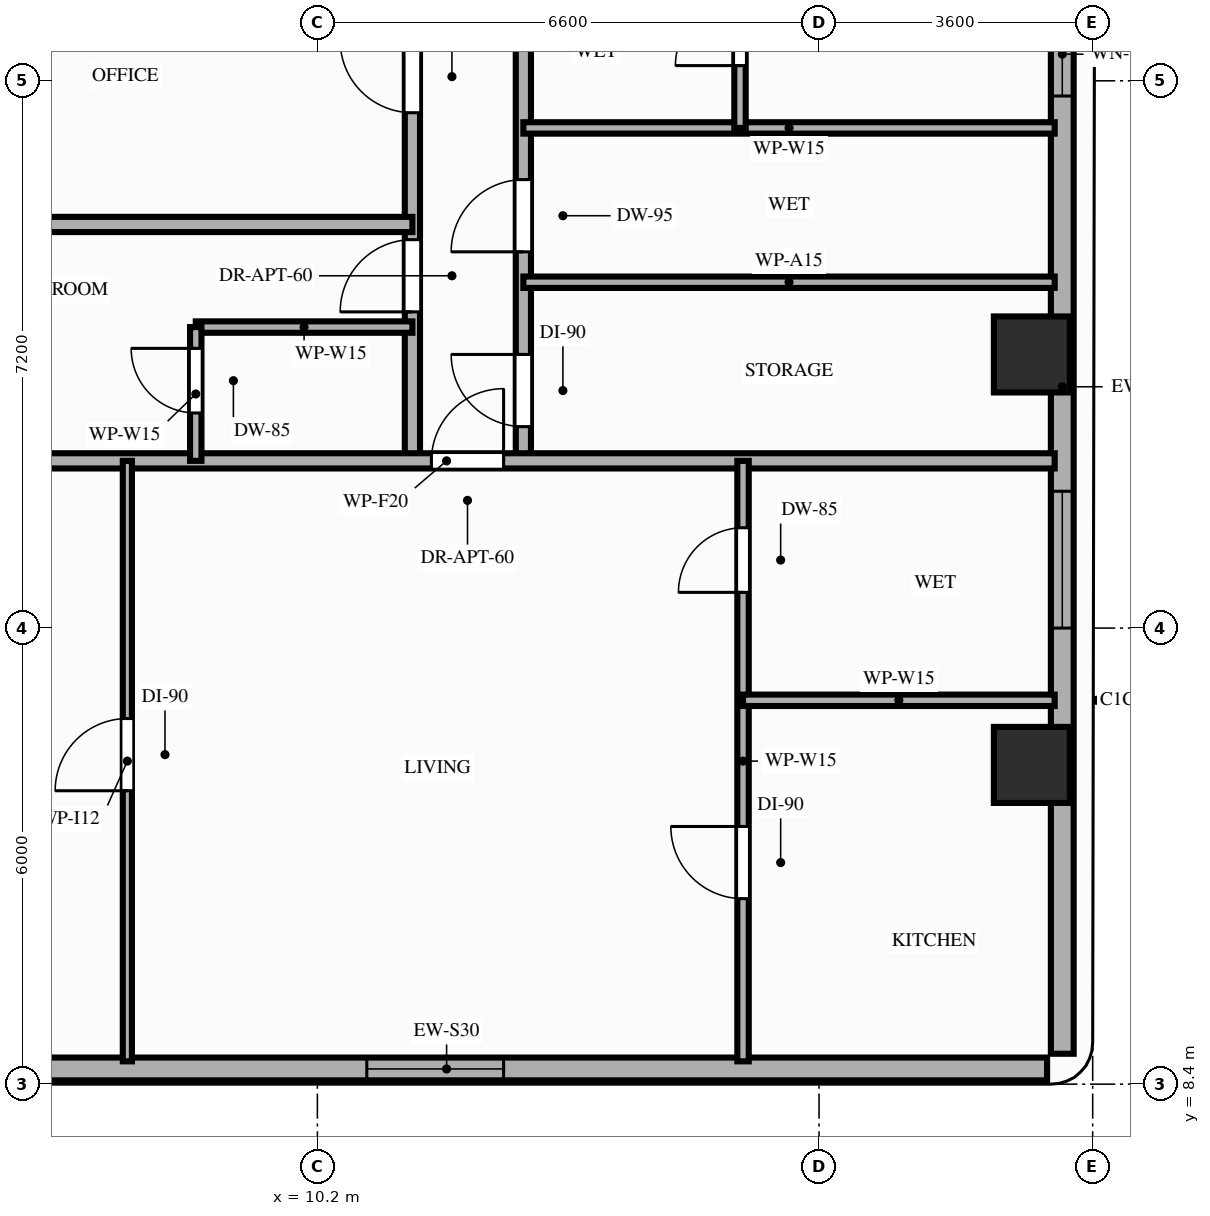
"""IFC4 building model, lengths in metres.
Left out: names, types, materials, properties, quantities, classifications, styles, units other than length and angle.
Written with IfcOpenShell. Run it as: python <this file> out.ifc"""

import sys

from ifc_helpers import new_model, si_unit, direction, frame, frame_2d, origin, origin_2d, place, context, subcontext, project, spatial, rectangle, extrude, element, fill, save


model = new_model("IFC4")
c1 = context("Model", 3, precision=1e-05, world=origin(), true_north=direction((0.0, 1.0)))
c2 = subcontext(c1, "Body", "Model", "MODEL_VIEW")
j1 = project(units=[si_unit("LENGTHUNIT", "METRE"), si_unit("PLANEANGLEUNIT", "RADIAN")], contexts=[c1])
p1 = place(None, origin())
s1 = spatial("IfcSite", under=j1, at=p1, CompositionType="ELEMENT")
p2 = place(p1, origin())
s2 = spatial("IfcBuilding", under=s1, at=p2, CompositionType="ELEMENT")
p3 = place(p2, frame((0.0, 0.0, 145.8)))
s3 = spatial("IfcBuildingStorey", under=s2, at=p3, CompositionType="ELEMENT", Elevation=145.8)
for number, where, z_axis, x_axis in (
    (1, (19.6, 12.6, 0.0), (0.0, 0.0, 1.0), (1.0, 0.0, 0.0)),
    (2, (19.6, 18.0, 0.0), (0.0, 0.0, 1.0), (1.0, 0.0, 0.0)),
):
    element("IfcColumn", number, at=place(p3, frame(where, z_axis=z_axis, x_axis=x_axis)), inside=s3, PredefinedType="COLUMN", context=c2, shape_type="SweptSolid", body=[
        extrude(rectangle(XDim=1.0, YDim=1.0, at=origin_2d()), origin(), (0.0, 0.0, 1.0), 3.2),
    ])
p4 = place(p3, frame((4.0, 8.6, 0.0), z_axis=(0.0, 0.0, 1.0), x_axis=(1.0, 0.0, 0.0)))
e3 = element("IfcWall", 3, at=p4, inside=s3, PredefinedType="STANDARD", context=c2, shape_type="SweptSolid", body=[
    extrude(rectangle(XDim=15.8, YDim=0.3, at=frame_2d((7.9, 0.0))), origin(), (0.0, 0.0, 1.0), 3.02),
])
p5 = place(p4, frame((6.85, 0.0, 0.85)))
e4 = element("IfcOpeningElement", 4, at=p5, cuts=e3, PredefinedType="OPENING", context=c2, shape_type="SweptSolid", body=[
    extrude(rectangle(XDim=1.8, YDim=1.75, at=frame_2d((0.9, 0.875))), frame((0.0, 0.16, 0.0), z_axis=(0.0, -1.0, 0.0), x_axis=(1.0, 0.0, 0.0)), (0.0, 0.0, 1.0), 0.32),
])
p6 = place(p3, frame((20.0, 8.8, 0.0), z_axis=(0.0, 0.0, 1.0), x_axis=(0.0, 1.0, 0.0)))
e5 = element("IfcWall", 5, at=p6, inside=s3, PredefinedType="STANDARD", context=c2, shape_type="SweptSolid", body=[
    extrude(rectangle(XDim=17.55, YDim=0.3, at=frame_2d((8.775, 0.0))), origin(), (0.0, 0.0, 1.0), 2.45),
])
p7 = place(p6, frame((12.6, 0.0, 0.85)))
e6 = element("IfcOpeningElement", 6, at=p7, cuts=e5, PredefinedType="OPENING", context=c2, shape_type="SweptSolid", body=[
    extrude(rectangle(XDim=1.1, YDim=1.35, at=frame_2d((0.55, 0.675))), frame((0.0, 0.16, 0.0), z_axis=(0.0, -1.0, 0.0), x_axis=(1.0, 0.0, 0.0)), (0.0, 0.0, 1.0), 0.32),
])
p8 = place(p6, frame((5.6, 0.0, 0.85)))
e7 = element("IfcOpeningElement", 7, at=p8, cuts=e5, PredefinedType="OPENING", context=c2, shape_type="SweptSolid", body=[
    extrude(rectangle(XDim=1.8, YDim=1.35, at=frame_2d((0.9, 0.675))), frame((0.0, 0.16, 0.0), z_axis=(0.0, -1.0, 0.0), x_axis=(1.0, 0.0, 0.0)), (0.0, 0.0, 1.0), 0.32),
])
p9 = place(p3, frame((11.45, 16.6, 0.0), z_axis=(0.0, 0.0, 1.0), x_axis=(0.0, 1.0, 0.0)))
e8 = element("IfcWall", 8, at=p9, inside=s3, PredefinedType="PARTITIONING", context=c2, shape_type="SweptSolid", body=[
    extrude(rectangle(XDim=11.5, YDim=0.2, at=frame_2d((5.75, 0.0))), origin(), (0.0, 0.0, 1.0), 2.45),
])
p10 = place(p9, frame((1.96, 0.0, 0.0)))
e9 = element("IfcOpeningElement", 9, at=p10, cuts=e8, PredefinedType="OPENING", context=c2, shape_type="SweptSolid", body=[
    extrude(rectangle(XDim=0.95, YDim=2.15, at=frame_2d((0.475, 1.075))), frame((0.0, 0.11, 0.0), z_axis=(0.0, -1.0, 0.0), x_axis=(1.0, 0.0, 0.0)), (0.0, 0.0, 1.0), 0.22),
])
p11 = place(p9, frame((4.58, 0.0, 0.0)))
e10 = element("IfcOpeningElement", 10, at=p11, cuts=e8, PredefinedType="OPENING", context=c2, shape_type="SweptSolid", body=[
    extrude(rectangle(XDim=0.95, YDim=2.15, at=frame_2d((0.475, 1.075))), frame((0.0, 0.11, 0.0), z_axis=(0.0, -1.0, 0.0), x_axis=(1.0, 0.0, 0.0)), (0.0, 0.0, 1.0), 0.22),
])
p12 = place(p9, frame((8.78, 0.0, 0.0)))
e11 = element("IfcOpeningElement", 11, at=p12, cuts=e8, PredefinedType="OPENING", context=c2, shape_type="SweptSolid", body=[
    extrude(rectangle(XDim=0.95, YDim=2.15, at=frame_2d((0.475, 1.075))), frame((0.0, 0.11, 0.0), z_axis=(0.0, -1.0, 0.0), x_axis=(1.0, 0.0, 0.0)), (0.0, 0.0, 1.0), 0.22),
])
p13 = place(p3, frame((12.91, 16.6, 0.0), z_axis=(0.0, 0.0, 1.0), x_axis=(0.0, 1.0, 0.0)))
e12 = element("IfcWall", 12, at=p13, inside=s3, PredefinedType="PARTITIONING", context=c2, shape_type="SweptSolid", body=[
    extrude(rectangle(XDim=11.5, YDim=0.2, at=frame_2d((5.75, 0.0))), origin(), (0.0, 0.0, 1.0), 2.45),
])
p14 = place(p13, frame((0.45, 0.0, 0.0)))
e13 = element("IfcOpeningElement", 13, at=p14, cuts=e12, PredefinedType="OPENING", context=c2, shape_type="SweptSolid", body=[
    extrude(rectangle(XDim=0.95, YDim=2.15, at=frame_2d((0.475, 1.075))), frame((0.0, 0.11, 0.0), z_axis=(0.0, -1.0, 0.0), x_axis=(1.0, 0.0, 0.0)), (0.0, 0.0, 1.0), 0.22),
])
p15 = place(p13, frame((2.75, 0.0, 0.0)))
e14 = element("IfcOpeningElement", 14, at=p15, cuts=e12, PredefinedType="OPENING", context=c2, shape_type="SweptSolid", body=[
    extrude(rectangle(XDim=0.95, YDim=2.1, at=frame_2d((0.475, 1.05))), frame((0.0, 0.11, 0.0), z_axis=(0.0, -1.0, 0.0), x_axis=(1.0, 0.0, 0.0)), (0.0, 0.0, 1.0), 0.22),
])
p16 = place(p13, frame((9.86, 0.0, 0.0)))
e15 = element("IfcOpeningElement", 15, at=p16, cuts=e12, PredefinedType="OPENING", context=c2, shape_type="SweptSolid", body=[
    extrude(rectangle(XDim=0.95, YDim=2.15, at=frame_2d((0.475, 1.075))), frame((0.0, 0.11, 0.0), z_axis=(0.0, -1.0, 0.0), x_axis=(1.0, 0.0, 0.0)), (0.0, 0.0, 1.0), 0.22),
])
p17 = place(p13, frame((7.27, 0.0, 0.0)))
e16 = element("IfcOpeningElement", 16, at=p17, cuts=e12, PredefinedType="OPENING", context=c2, shape_type="SweptSolid", body=[
    extrude(rectangle(XDim=0.95, YDim=2.15, at=frame_2d((0.475, 1.075))), frame((0.0, 0.11, 0.0), z_axis=(0.0, -1.0, 0.0), x_axis=(1.0, 0.0, 0.0)), (0.0, 0.0, 1.0), 0.22),
])
p18 = place(p3, frame((3.9, 16.6, 0.0), z_axis=(0.0, 0.0, 1.0), x_axis=(1.0, 0.0, 0.0)))
e17 = element("IfcWall", 17, at=p18, inside=s3, PredefinedType="PARTITIONING", context=c2, shape_type="SweptSolid", body=[
    extrude(rectangle(XDim=16.0, YDim=0.2, at=frame_2d((8.0, 0.0))), origin(), (0.0, 0.0, 1.0), 2.45),
])
p19 = place(p18, frame((7.8, 0.0, 0.0)))
e18 = element("IfcOpeningElement", 18, at=p19, cuts=e17, PredefinedType="OPENING", context=c2, shape_type="SweptSolid", body=[
    extrude(rectangle(XDim=0.95, YDim=2.15, at=frame_2d((0.475, 1.075))), frame((0.0, 0.11, 0.0), z_axis=(0.0, -1.0, 0.0), x_axis=(1.0, 0.0, 0.0)), (0.0, 0.0, 1.0), 0.22),
])
p20 = place(p3, frame((8.6, 18.36, 0.0), z_axis=(0.0, 0.0, 1.0), x_axis=(1.0, 0.0, 0.0)))
e19 = element("IfcWall", 19, at=p20, inside=s3, PredefinedType="PARTITIONING", context=c2, shape_type="SweptSolid", body=[
    extrude(rectangle(XDim=2.85, YDim=0.15, at=frame_2d((1.425, 0.0))), origin(), (0.0, 0.0, 1.0), 2.45),
])
p21 = place(p3, frame((8.6, 16.6, 0.0), z_axis=(0.0, 0.0, 1.0), x_axis=(0.0, 1.0, 0.0)))
e20 = element("IfcWall", 20, at=p21, inside=s3, PredefinedType="PARTITIONING", context=c2, shape_type="SweptSolid", body=[
    extrude(rectangle(XDim=1.76, YDim=0.15, at=frame_2d((0.88, 0.0))), origin(), (0.0, 0.0, 1.0), 2.45),
])
p22 = place(p21, frame((0.63, 0.0, 0.0)))
e21 = element("IfcOpeningElement", 21, at=p22, cuts=e20, PredefinedType="OPENING", context=c2, shape_type="SweptSolid", body=[
    extrude(rectangle(XDim=0.85, YDim=2.1, at=frame_2d((0.425, 1.05))), frame((0.0, 0.085, 0.0), z_axis=(0.0, -1.0, 0.0), x_axis=(1.0, 0.0, 0.0)), (0.0, 0.0, 1.0), 0.17),
])
p23 = place(p3, frame((3.9, 19.71, 0.0), z_axis=(0.0, 0.0, 1.0), x_axis=(1.0, 0.0, 0.0)))
e22 = element("IfcWall", 22, at=p23, inside=s3, PredefinedType="PARTITIONING", context=c2, shape_type="SweptSolid", body=[
    extrude(rectangle(XDim=7.55, YDim=0.2, at=frame_2d((3.775, 0.0))), origin(), (0.0, 0.0, 1.0), 2.45),
])
p24 = place(p3, frame((7.7, 8.7, 0.0), z_axis=(0.0, 0.0, 1.0), x_axis=(0.0, 1.0, 0.0)))
e23 = element("IfcWall", 23, at=p24, inside=s3, PredefinedType="PARTITIONING", context=c2, shape_type="SweptSolid", body=[
    extrude(rectangle(XDim=7.9, YDim=0.12, at=frame_2d((3.95, 0.0))), origin(), (0.0, 0.0, 1.0), 2.45),
])
p25 = place(p24, frame((3.56, 0.0, 0.0)))
e24 = element("IfcOpeningElement", 24, at=p25, cuts=e23, PredefinedType="OPENING", context=c2, shape_type="SweptSolid", body=[
    extrude(rectangle(XDim=0.95, YDim=2.15, at=frame_2d((0.475, 1.075))), frame((0.0, 0.07, 0.0), z_axis=(0.0, -1.0, 0.0), x_axis=(1.0, 0.0, 0.0)), (0.0, 0.0, 1.0), 0.14),
])
p26 = place(p3, frame((15.8, 8.7, 0.0), z_axis=(0.0, 0.0, 1.0), x_axis=(0.0, 1.0, 0.0)))
e25 = element("IfcWall", 25, at=p26, inside=s3, PredefinedType="PARTITIONING", context=c2, shape_type="SweptSolid", body=[
    extrude(rectangle(XDim=7.9, YDim=0.15, at=frame_2d((3.95, 0.0))), origin(), (0.0, 0.0, 1.0), 2.45),
])
p27 = place(p26, frame((2.14, 0.0, 0.0)))
e26 = element("IfcOpeningElement", 26, at=p27, cuts=e25, PredefinedType="OPENING", context=c2, shape_type="SweptSolid", body=[
    extrude(rectangle(XDim=0.95, YDim=2.15, at=frame_2d((0.475, 1.075))), frame((0.0, 0.085, 0.0), z_axis=(0.0, -1.0, 0.0), x_axis=(1.0, 0.0, 0.0)), (0.0, 0.0, 1.0), 0.17),
])
p28 = place(p26, frame((6.17, 0.0, 0.0)))
e27 = element("IfcOpeningElement", 27, at=p28, cuts=e25, PredefinedType="OPENING", context=c2, shape_type="SweptSolid", body=[
    extrude(rectangle(XDim=0.85, YDim=2.1, at=frame_2d((0.425, 1.05))), frame((0.0, 0.085, 0.0), z_axis=(0.0, -1.0, 0.0), x_axis=(1.0, 0.0, 0.0)), (0.0, 0.0, 1.0), 0.17),
])
p29 = place(p3, frame((15.8, 13.45, 0.0), z_axis=(0.0, 0.0, 1.0), x_axis=(1.0, 0.0, 0.0)))
e28 = element("IfcWall", 28, at=p29, inside=s3, PredefinedType="PARTITIONING", context=c2, shape_type="SweptSolid", body=[
    extrude(rectangle(XDim=4.1, YDim=0.15, at=frame_2d((2.05, 0.0))), origin(), (0.0, 0.0, 1.0), 2.45),
])
for number, where, z_axis, x_axis in (
    (29, (12.91, 18.95, 0.0), (0.0, 0.0, 1.0), (1.0, 0.0, 0.0)),
    (30, (12.91, 20.98, 0.0), (0.0, 0.0, 1.0), (1.0, 0.0, 0.0)),
):
    element("IfcWall", number, at=place(p3, frame(where, z_axis=z_axis, x_axis=x_axis)), inside=s3, PredefinedType="PARTITIONING", context=c2, shape_type="SweptSolid", body=[
        extrude(rectangle(XDim=6.99, YDim=0.15, at=frame_2d((3.495, 0.0))), origin(), (0.0, 0.0, 1.0), 2.45),
    ])
p30 = place(p3, frame((15.76, 20.98, 0.0), z_axis=(0.0, 0.0, 1.0), x_axis=(0.0, 1.0, 0.0)))
e31 = element("IfcWall", 31, at=p30, inside=s3, PredefinedType="PARTITIONING", context=c2, shape_type="SweptSolid", body=[
    extrude(rectangle(XDim=1.95, YDim=0.15, at=frame_2d((0.975, 0.0))), origin(), (0.0, 0.0, 1.0), 3.02),
])
p31 = place(p30, frame((0.82, 0.0, 0.0)))
e32 = element("IfcOpeningElement", 32, at=p31, cuts=e31, PredefinedType="OPENING", context=c2, shape_type="SweptSolid", body=[
    extrude(rectangle(XDim=0.85, YDim=2.1, at=frame_2d((0.425, 1.05))), frame((0.0, 0.085, 0.0), z_axis=(0.0, -1.0, 0.0), x_axis=(1.0, 0.0, 0.0)), (0.0, 0.0, 1.0), 0.17),
])
p32 = place(p5, origin())
e33 = element("IfcWindow", 33, at=p32, inside=s3, PartitioningType="SINGLE_PANEL", PredefinedType="WINDOW", context=c2, shape_type="SweptSolid", body=[
    extrude(rectangle(XDim=1.8, YDim=1.75, at=frame_2d((0.9, 0.875))), frame((0.0, 0.03, 0.0), z_axis=(0.0, -1.0, 0.0), x_axis=(1.0, 0.0, 0.0)), (0.0, 0.0, 1.0), 0.06),
])
fill(e4, e33)
p33 = place(p7, origin())
e34 = element("IfcWindow", 34, at=p33, inside=s3, PartitioningType="SINGLE_PANEL", PredefinedType="WINDOW", context=c2, shape_type="SweptSolid", body=[
    extrude(rectangle(XDim=1.1, YDim=1.35, at=frame_2d((0.55, 0.675))), frame((0.0, 0.03, 0.0), z_axis=(0.0, -1.0, 0.0), x_axis=(1.0, 0.0, 0.0)), (0.0, 0.0, 1.0), 0.06),
])
fill(e6, e34)
p34 = place(p8, origin())
e35 = element("IfcWindow", 35, at=p34, inside=s3, PartitioningType="SINGLE_PANEL", PredefinedType="WINDOW", context=c2, shape_type="SweptSolid", body=[
    extrude(rectangle(XDim=1.8, YDim=1.35, at=frame_2d((0.9, 0.675))), frame((0.0, 0.03, 0.0), z_axis=(0.0, -1.0, 0.0), x_axis=(1.0, 0.0, 0.0)), (0.0, 0.0, 1.0), 0.06),
])
fill(e7, e35)
p35 = place(p22, origin())
e36 = element("IfcDoor", 36, at=p35, inside=s3, OperationType="SINGLE_SWING_RIGHT", PredefinedType="DOOR", context=c2, shape_type="SweptSolid", body=[
    extrude(rectangle(XDim=0.85, YDim=2.1, at=frame_2d((0.425, 1.05))), frame((0.0, 0.025, 0.0), z_axis=(0.0, -1.0, 0.0), x_axis=(1.0, 0.0, 0.0)), (0.0, 0.0, 1.0), 0.05),
])
fill(e21, e36)
p36 = place(p10, origin())
e37 = element("IfcDoor", 37, at=p36, inside=s3, OperationType="SINGLE_SWING_LEFT", PredefinedType="DOOR", context=c2, shape_type="SweptSolid", body=[
    extrude(rectangle(XDim=0.95, YDim=2.15, at=frame_2d((0.475, 1.075))), frame((0.0, 0.025, 0.0), z_axis=(0.0, -1.0, 0.0), x_axis=(1.0, 0.0, 0.0)), (0.0, 0.0, 1.0), 0.05),
])
fill(e9, e37)
p37 = place(p11, origin())
e38 = element("IfcDoor", 38, at=p37, inside=s3, OperationType="SINGLE_SWING_RIGHT", PredefinedType="DOOR", context=c2, shape_type="SweptSolid", body=[
    extrude(rectangle(XDim=0.95, YDim=2.15, at=frame_2d((0.475, 1.075))), frame((0.0, 0.025, 0.0), z_axis=(0.0, -1.0, 0.0), x_axis=(1.0, 0.0, 0.0)), (0.0, 0.0, 1.0), 0.05),
])
fill(e10, e38)
p38 = place(p19, origin())
e39 = element("IfcDoor", 39, at=p38, inside=s3, OperationType="SINGLE_SWING_RIGHT", PredefinedType="DOOR", context=c2, shape_type="SweptSolid", body=[
    extrude(rectangle(XDim=0.95, YDim=2.15, at=frame_2d((0.475, 1.075))), frame((0.0, 0.025, 0.0), z_axis=(0.0, -1.0, 0.0), x_axis=(1.0, 0.0, 0.0)), (0.0, 0.0, 1.0), 0.05),
])
fill(e18, e39)
p39 = place(p25, origin())
e40 = element("IfcDoor", 40, at=p39, inside=s3, OperationType="SINGLE_SWING_LEFT", PredefinedType="DOOR", context=c2, shape_type="SweptSolid", body=[
    extrude(rectangle(XDim=0.95, YDim=2.15, at=frame_2d((0.475, 1.075))), frame((0.0, 0.025, 0.0), z_axis=(0.0, -1.0, 0.0), x_axis=(1.0, 0.0, 0.0)), (0.0, 0.0, 1.0), 0.05),
])
fill(e24, e40)
p40 = place(p27, origin())
e41 = element("IfcDoor", 41, at=p40, inside=s3, OperationType="SINGLE_SWING_RIGHT", PredefinedType="DOOR", context=c2, shape_type="SweptSolid", body=[
    extrude(rectangle(XDim=0.95, YDim=2.15, at=frame_2d((0.475, 1.075))), frame((0.0, 0.025, 0.0), z_axis=(0.0, -1.0, 0.0), x_axis=(1.0, 0.0, 0.0)), (0.0, 0.0, 1.0), 0.05),
])
fill(e26, e41)
p41 = place(p28, origin())
e42 = element("IfcDoor", 42, at=p41, inside=s3, OperationType="SINGLE_SWING_LEFT", PredefinedType="DOOR", context=c2, shape_type="SweptSolid", body=[
    extrude(rectangle(XDim=0.85, YDim=2.1, at=frame_2d((0.425, 1.05))), frame((0.0, 0.025, 0.0), z_axis=(0.0, -1.0, 0.0), x_axis=(1.0, 0.0, 0.0)), (0.0, 0.0, 1.0), 0.05),
])
fill(e27, e42)
p42 = place(p14, origin())
e43 = element("IfcDoor", 43, at=p42, inside=s3, OperationType="SINGLE_SWING_RIGHT", PredefinedType="DOOR", context=c2, shape_type="SweptSolid", body=[
    extrude(rectangle(XDim=0.95, YDim=2.15, at=frame_2d((0.475, 1.075))), frame((0.0, 0.025, 0.0), z_axis=(0.0, -1.0, 0.0), x_axis=(1.0, 0.0, 0.0)), (0.0, 0.0, 1.0), 0.05),
])
fill(e13, e43)
p43 = place(p15, origin())
e44 = element("IfcDoor", 44, at=p43, inside=s3, OperationType="SINGLE_SWING_LEFT", PredefinedType="DOOR", context=c2, shape_type="SweptSolid", body=[
    extrude(rectangle(XDim=0.95, YDim=2.1, at=frame_2d((0.475, 1.05))), frame((0.0, 0.025, 0.0), z_axis=(0.0, -1.0, 0.0), x_axis=(1.0, 0.0, 0.0)), (0.0, 0.0, 1.0), 0.05),
])
fill(e14, e44)
p44 = place(p31, origin())
e45 = element("IfcDoor", 45, at=p44, inside=s3, OperationType="SINGLE_SWING_LEFT", PredefinedType="DOOR", context=c2, shape_type="SweptSolid", body=[
    extrude(rectangle(XDim=0.85, YDim=2.1, at=frame_2d((0.425, 1.05))), frame((0.0, 0.025, 0.0), z_axis=(0.0, -1.0, 0.0), x_axis=(1.0, 0.0, 0.0)), (0.0, 0.0, 1.0), 0.05),
])
fill(e32, e45)
save(model, sys.argv[1])
